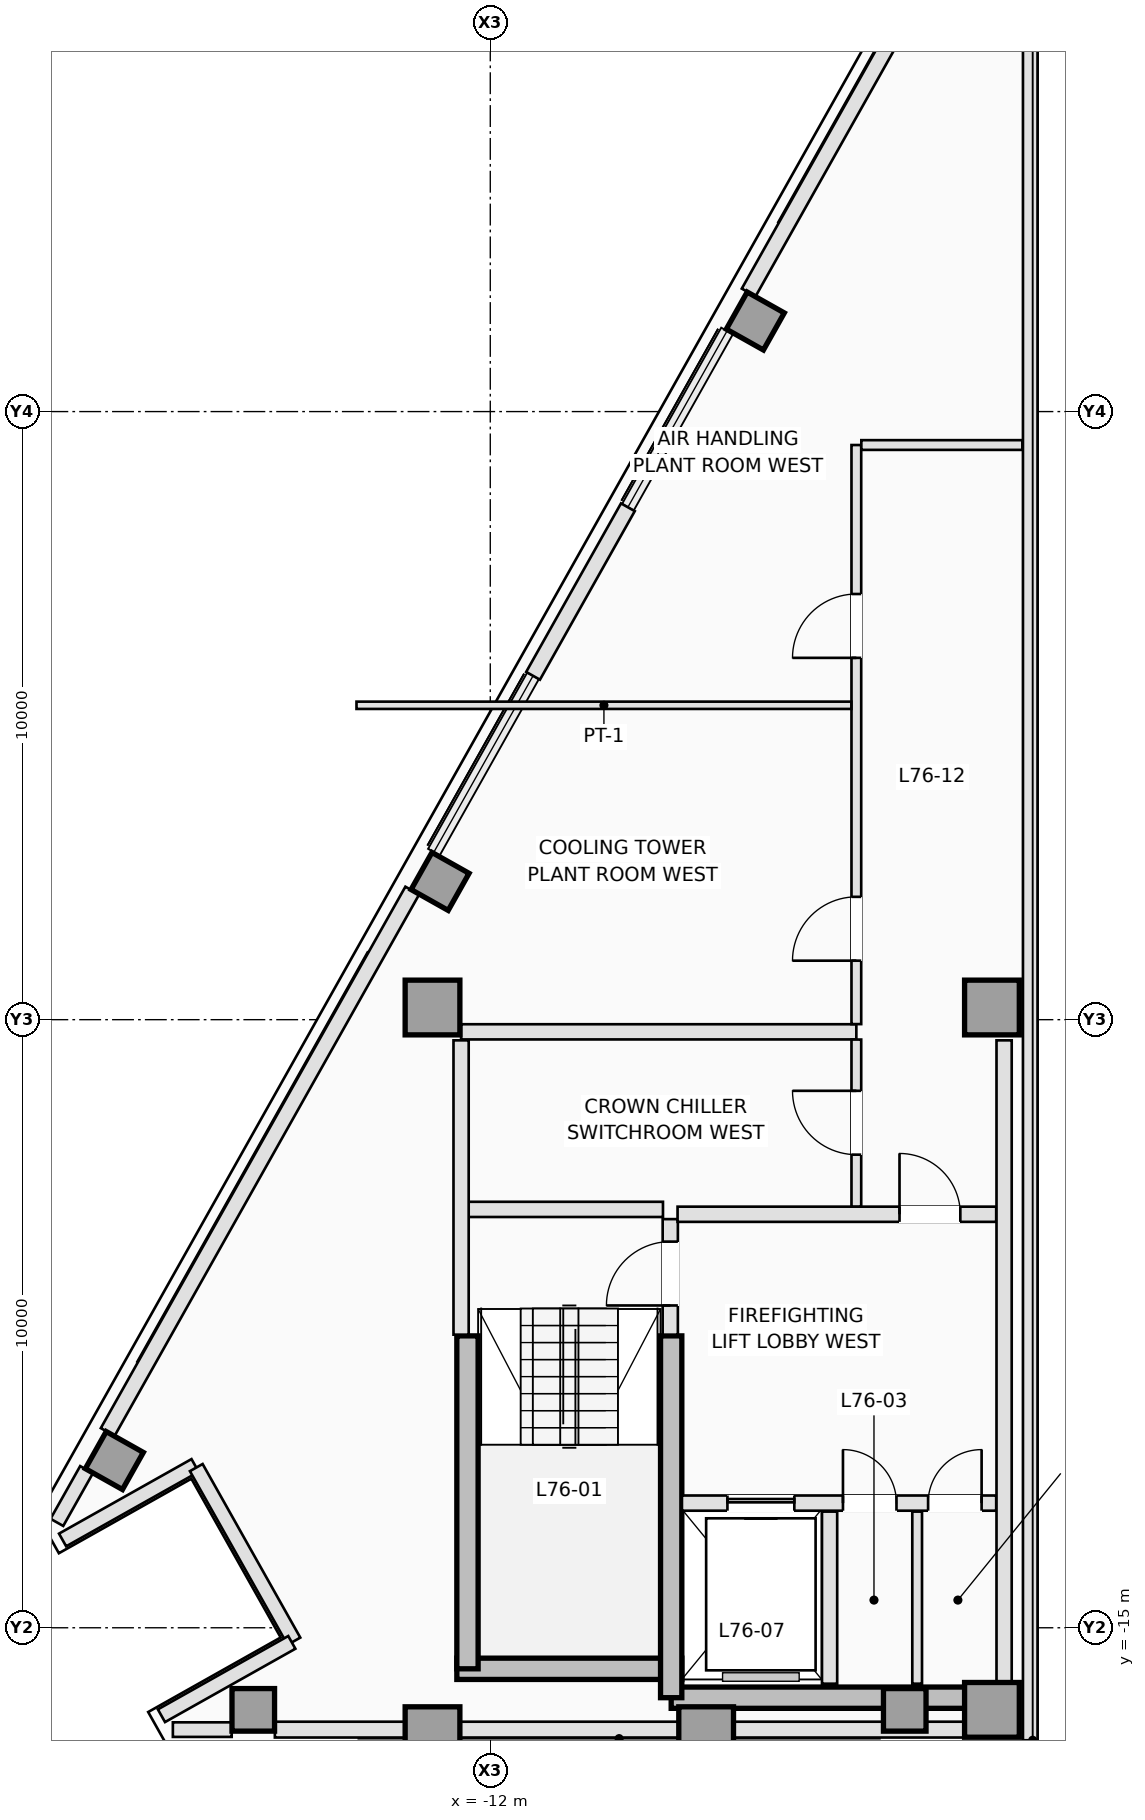
"""IFC4 building model, lengths in metres.
Left out: names, types, materials, properties, quantities, classifications, styles, units other than length and angle.
Written with IfcOpenShell. Run it as: python <this file> out.ifc"""

import sys

from ifc_helpers import new_model, si_unit, direction, frame, frame_2d, origin, origin_2d, place, context, subcontext, project, spatial, rectangle, extrude, element, fill, save


model = new_model("IFC4")
c1 = context("Model", 3, precision=1e-05, world=origin(), true_north=direction((0.0, 1.0)))
c2 = subcontext(c1, "Body", "Model", "MODEL_VIEW")
j1 = project(units=[si_unit("LENGTHUNIT", "METRE"), si_unit("PLANEANGLEUNIT", "RADIAN")], contexts=[c1])
p1 = place(None, origin())
s1 = spatial("IfcSite", under=j1, at=p1, CompositionType="ELEMENT")
p2 = place(p1, origin())
s2 = spatial("IfcBuilding", under=s1, at=p2, CompositionType="ELEMENT")
p3 = place(p2, frame((0.0, 0.0, 274.1)))
s3 = spatial("IfcBuildingStorey", under=s2, at=p3, CompositionType="ELEMENT", Elevation=274.1)
p4 = place(p3, frame((-12.55, -15.675, 0.0), z_axis=(0.0, 0.0, 1.0), x_axis=(1.0, 0.0, 0.0)))
e1 = element("IfcWall", 1, at=p4, inside=s3, PredefinedType="SHEAR", context=c2, shape_type="SweptSolid", body=[
    extrude(rectangle(XDim=3.7, YDim=0.35, at=frame_2d((1.85, 0.0))), origin(), (0.0, 0.0, 1.0), 3.2),
])
p5 = place(p3, frame((-9.025, -16.15, 0.0), z_axis=(0.0, 0.0, 1.0), x_axis=(1.0, 0.0, 0.0)))
e2 = element("IfcWall", 2, at=p5, inside=s3, PredefinedType="SHEAR", context=c2, shape_type="SweptSolid", body=[
    extrude(rectangle(XDim=5.275, YDim=0.35, at=frame_2d((2.637, 0.0))), origin(), (0.0, 0.0, 1.0), 3.2),
])
p6 = place(p3, frame((-12.375, -15.675, 0.0), z_axis=(0.0, 0.0, 1.0), x_axis=(0.0, 1.0, 0.0)))
e3 = element("IfcWall", 3, at=p6, inside=s3, PredefinedType="SHEAR", context=c2, shape_type="SweptSolid", body=[
    extrude(rectangle(XDim=5.475, YDim=0.35, at=frame_2d((2.738, 0.0))), origin(), (0.0, 0.0, 1.0), 3.2),
])
p7 = place(p3, frame((-9.025, -16.15, 0.0), z_axis=(0.0, 0.0, 1.0), x_axis=(0.0, 1.0, 0.0)))
e4 = element("IfcWall", 4, at=p7, inside=s3, PredefinedType="SHEAR", context=c2, shape_type="SweptSolid", body=[
    extrude(rectangle(XDim=5.95, YDim=0.35, at=frame_2d((2.975, 0.0))), origin(), (0.0, 0.0, 1.0), 3.2),
])
for number, where, z_axis, x_axis in (
    (5, (-12.95, -16.75, 0.0), (0.0, 0.0, 1.0), (1.0, 0.0, 0.0)),
    (6, (-8.45, -16.75, 0.0), (0.0, 0.0, 1.0), (1.0, 0.0, 0.0)),
    (7, (-3.75, -16.35, 0.0), (0.0, 0.0, 1.0), (1.0, 0.0, 0.0)),
    (8, (-12.95, -4.8, 0.0), (0.0, 0.0, 1.0), (1.0, 0.0, 0.0)),
    (9, (-3.75, -4.8, 0.0), (0.0, 0.0, 1.0), (1.0, 0.0, 0.0)),
):
    element("IfcColumn", number, at=place(p3, frame(where, z_axis=z_axis, x_axis=x_axis)), inside=s3, PredefinedType="COLUMN", context=c2, shape_type="SweptSolid", body=[
        extrude(rectangle(XDim=0.9, YDim=0.9, at=origin_2d()), origin(), (0.0, 0.0, 1.0), 3.2),
    ])
for number, where, z_axis, x_axis in (
    (10, (-15.898, -16.35, 0.0), (0.0, 0.0, 1.0), (0.0, 1.0, 0.0)),
    (11, (-5.184, -16.35, 0.0), (0.0, 0.0, 1.0), (0.0, 1.0, 0.0)),
    (12, (-7.642, 6.489, 0.0), (0.0, 0.0, 1.0), (-0.872, 0.49, 0.0)),
    (13, (-12.825, -2.727, 0.0), (0.0, 0.0, 1.0), (-0.872, 0.49, 0.0)),
    (14, (-18.182, -12.25, 0.0), (0.0, 0.0, 1.0), (-0.872, 0.49, 0.0)),
):
    element("IfcColumn", number, at=place(p3, frame(where, z_axis=z_axis, x_axis=x_axis)), inside=s3, PredefinedType="COLUMN", context=c2, shape_type="SweptSolid", body=[
        extrude(rectangle(XDim=0.7, YDim=0.7, at=origin_2d()), origin(), (0.0, 0.0, 1.0), 3.2),
    ])
p8 = place(p3, frame((-16.253, -16.675, 0.0), z_axis=(0.0, 0.0, 1.0), x_axis=(-1.0, 0.0, 0.0)))
e15 = element("IfcWall", 15, at=p8, inside=s3, PredefinedType="STANDARD", context=c2, shape_type="SweptSolid", body=[
    extrude(rectangle(XDim=0.967, YDim=0.24, at=frame_2d((0.484, 0.0))), origin(), (0.0, 0.0, 1.0), 2.92),
])
p9 = place(p3, frame((-4.22, -16.675, 0.0), z_axis=(0.0, 0.0, 1.0), x_axis=(-1.0, 0.0, 0.0)))
e16 = element("IfcWall", 16, at=p9, inside=s3, PredefinedType="STANDARD", context=c2, shape_type="SweptSolid", body=[
    extrude(rectangle(XDim=11.323, YDim=0.26, at=frame_2d((5.661, 0.0))), origin(), (0.0, 0.0, 1.0), 2.204),
])
p10 = place(p3, frame((-19.127, -13.267, 0.0), z_axis=(0.0, 0.0, 1.0), x_axis=(0.490261239633, 0.871575537125, 0.0)))
e17 = element("IfcWall", 17, at=p10, inside=s3, PredefinedType="STANDARD", context=c2, shape_type="SweptSolid", body=[
    extrude(rectangle(XDim=0.995, YDim=0.24, at=frame_2d((0.498, 0.0))), origin(), (0.0, 0.0, 1.0), 2.92),
])
p11 = place(p3, frame((-18.292, -11.781, 0.0), z_axis=(0.0, 0.0, 1.0), x_axis=(0.490270316201, 0.871570431492, 0.0)))
e18 = element("IfcWall", 18, at=p11, inside=s3, PredefinedType="STANDARD", context=c2, shape_type="SweptSolid", body=[
    extrude(rectangle(XDim=10.216, YDim=0.26, at=frame_2d((5.108, 0.0))), origin(), (0.0, 0.0, 1.0), 2.92),
])
p12 = place(p3, frame((-7.751, 6.958, 0.0), z_axis=(0.0, 0.0, 1.0), x_axis=(0.490260105081, 0.871576175309, 0.0)))
e19 = element("IfcWall", 19, at=p12, inside=s3, PredefinedType="STANDARD", context=c2, shape_type="SweptSolid", body=[
    extrude(rectangle(XDim=10.217, YDim=0.26, at=frame_2d((5.108, 0.0))), origin(), (0.0, 0.0, 1.0), 2.92),
])
p13 = place(p3, frame((-11.296, 0.655, 0.0), z_axis=(0.0, 0.0, 1.0), x_axis=(0.490283106586, 0.871563236602, 0.0)))
e20 = element("IfcWall", 20, at=p13, inside=s3, PredefinedType="STANDARD", context=c2, shape_type="SweptSolid", body=[
    extrude(rectangle(XDim=3.18, YDim=0.26, at=frame_2d((1.59, 0.0))), origin(), (0.0, 0.0, 1.0), 2.92),
])
p14 = place(p3, frame((-19.033, -13.556, 0.0), z_axis=(0.0, 0.0, 1.0), x_axis=(0.871588577066, 0.490238056792, 0.0)))
e21 = element("IfcWall", 21, at=p14, inside=s3, PredefinedType="STANDARD", context=c2, shape_type="SweptSolid", body=[
    extrude(rectangle(XDim=2.5, YDim=0.24, at=frame_2d((1.25, 0.0))), origin(), (0.0, 0.0, 1.0), 2.92),
])
p15 = place(p3, frame((-16.835, -12.366, 0.0), z_axis=(0.0, 0.0, 1.0), x_axis=(0.490293083368, -0.871557624258, 0.0)))
e22 = element("IfcWall", 22, at=p15, inside=s3, PredefinedType="STANDARD", context=c2, shape_type="SweptSolid", body=[
    extrude(rectangle(XDim=3.276, YDim=0.24, at=frame_2d((1.638, 0.0))), origin(), (0.0, 0.0, 1.0), 2.204),
])
p16 = place(p3, frame((-15.264, -15.24, 0.0), z_axis=(0.0, 0.0, 1.0), x_axis=(-0.87157023615, -0.490270663468, 0.0)))
e23 = element("IfcWall", 23, at=p16, inside=s3, PredefinedType="STANDARD", context=c2, shape_type="SweptSolid", body=[
    extrude(rectangle(XDim=2.46, YDim=0.24, at=frame_2d((1.23, 0.0))), origin(), (0.0, 0.0, 1.0), 2.92),
])
p17 = place(p3, frame((-3.12, 17.2, 0.0), z_axis=(0.0, 0.0, 1.0), x_axis=(0.0, -1.0, 0.0)))
e24 = element("IfcWall", 24, at=p17, inside=s3, PredefinedType="STANDARD", context=c2, shape_type="SweptSolid", body=[
    extrude(rectangle(XDim=34.05, YDim=0.24, at=frame_2d((17.025, 0.0))), origin(), (0.0, 0.0, 1.0), 2.204),
])
p18 = place(p3, frame((-9.04, -10.18, 0.0), z_axis=(0.0, 0.0, 1.0), x_axis=(0.0, 1.0, 0.0)))
e25 = element("IfcWall", 25, at=p18, inside=s3, PredefinedType="PARTITIONING", context=c2, shape_type="SweptSolid", body=[
    extrude(rectangle(XDim=1.9, YDim=0.25, at=frame_2d((0.95, 0.0))), origin(), (0.0, 0.0, 1.0), 2.92),
])
p19 = place(p18, frame((0.48, 0.0, 0.0)))
e26 = element("IfcOpeningElement", 26, at=p19, cuts=e25, PredefinedType="OPENING", context=c2, shape_type="SweptSolid", body=[
    extrude(rectangle(XDim=1.05, YDim=2.15, at=frame_2d((0.525, 1.075))), frame((0.0, 0.135, 0.0), z_axis=(0.0, -1.0, 0.0), x_axis=(1.0, 0.0, 0.0)), (0.0, 0.0, 1.0), 0.27),
])
p20 = place(p3, frame((-12.38, -8.12, 0.0), z_axis=(0.0, 0.0, 1.0), x_axis=(1.0, 0.0, 0.0)))
e27 = element("IfcWall", 27, at=p20, inside=s3, PredefinedType="PARTITIONING", context=c2, shape_type="SweptSolid", body=[
    extrude(rectangle(XDim=3.22, YDim=0.25, at=frame_2d((1.61, 0.0))), origin(), (0.0, 0.0, 1.0), 2.92),
])
p21 = place(p3, frame((-12.48, -10.18, 0.0), z_axis=(0.0, 0.0, 1.0), x_axis=(0.0, 1.0, 0.0)))
e28 = element("IfcWall", 28, at=p21, inside=s3, PredefinedType="PARTITIONING", context=c2, shape_type="SweptSolid", body=[
    extrude(rectangle(XDim=4.84, YDim=0.25, at=frame_2d((2.42, 0.0))), origin(), (0.0, 0.0, 1.0), 2.92),
])
p22 = place(p3, frame((-8.848, -12.95, 0.0), z_axis=(0.0, 0.0, 1.0), x_axis=(1.0, 0.0, 0.0)))
e29 = element("IfcWall", 29, at=p22, inside=s3, PredefinedType="PARTITIONING", context=c2, shape_type="SweptSolid", body=[
    extrude(rectangle(XDim=5.168, YDim=0.25, at=frame_2d((2.584, 0.0))), origin(), (0.0, 0.0, 1.0), 2.92),
])
p23 = place(p22, frame((0.748, 0.0, 0.0)))
e30 = element("IfcOpeningElement", 30, at=p23, cuts=e29, PredefinedType="OPENING", context=c2, shape_type="SweptSolid", body=[
    extrude(rectangle(XDim=1.1, YDim=2.15, at=frame_2d((0.55, 1.075))), frame((0.0, 0.135, 0.0), z_axis=(0.0, -1.0, 0.0), x_axis=(1.0, 0.0, 0.0)), (0.0, 0.0, 1.0), 0.27),
])
p24 = place(p22, frame((2.648, 0.0, 0.0)))
e31 = element("IfcOpeningElement", 31, at=p24, cuts=e29, PredefinedType="OPENING", context=c2, shape_type="SweptSolid", body=[
    extrude(rectangle(XDim=0.88, YDim=2.1, at=frame_2d((0.44, 1.05))), frame((0.0, 0.135, 0.0), z_axis=(0.0, -1.0, 0.0), x_axis=(1.0, 0.0, 0.0)), (0.0, 0.0, 1.0), 0.27),
])
p25 = place(p22, frame((4.048, 0.0, 0.0)))
e32 = element("IfcOpeningElement", 32, at=p25, cuts=e29, PredefinedType="OPENING", context=c2, shape_type="SweptSolid", body=[
    extrude(rectangle(XDim=0.88, YDim=2.1, at=frame_2d((0.44, 1.05))), frame((0.0, 0.135, 0.0), z_axis=(0.0, -1.0, 0.0), x_axis=(1.0, 0.0, 0.0)), (0.0, 0.0, 1.0), 0.27),
])
p26 = place(p3, frame((-6.42, -15.92, 0.0), z_axis=(0.0, 0.0, 1.0), x_axis=(0.0, 1.0, 0.0)))
e33 = element("IfcWall", 33, at=p26, inside=s3, PredefinedType="PARTITIONING", context=c2, shape_type="SweptSolid", body=[
    extrude(rectangle(XDim=2.83, YDim=0.25, at=frame_2d((1.415, 0.0))), origin(), (0.0, 0.0, 1.0), 2.92),
])
p27 = place(p3, frame((-4.98, -15.92, 0.0), z_axis=(0.0, 0.0, 1.0), x_axis=(0.0, 1.0, 0.0)))
e34 = element("IfcWall", 34, at=p27, inside=s3, PredefinedType="PARTITIONING", context=c2, shape_type="SweptSolid", body=[
    extrude(rectangle(XDim=2.83, YDim=0.16, at=frame_2d((1.415, 0.0))), origin(), (0.0, 0.0, 1.0), 2.92),
])
p28 = place(p3, frame((-8.92, -8.2, 0.0), z_axis=(0.0, 0.0, 1.0), x_axis=(1.0, 0.0, 0.0)))
e35 = element("IfcWall", 35, at=p28, inside=s3, PredefinedType="PARTITIONING", context=c2, shape_type="SweptSolid", body=[
    extrude(rectangle(XDim=5.24, YDim=0.25, at=frame_2d((2.62, 0.0))), origin(), (0.0, 0.0, 1.0), 2.92),
])
p29 = place(p28, frame((3.65, 0.0, 0.0)))
e36 = element("IfcOpeningElement", 36, at=p29, cuts=e35, PredefinedType="OPENING", context=c2, shape_type="SweptSolid", body=[
    extrude(rectangle(XDim=1.0, YDim=2.15, at=frame_2d((0.5, 1.075))), frame((0.0, 0.135, 0.0), z_axis=(0.0, -1.0, 0.0), x_axis=(1.0, 0.0, 0.0)), (0.0, 0.0, 1.0), 0.27),
])
p30 = place(p3, frame((-3.55, -15.898, 0.0), z_axis=(0.0, 0.0, 1.0), x_axis=(0.0, 1.0, 0.0)))
e37 = element("IfcWall", 37, at=p30, inside=s3, PredefinedType="PARTITIONING", context=c2, shape_type="SweptSolid", body=[
    extrude(rectangle(XDim=10.558, YDim=0.25, at=frame_2d((5.279, 0.0))), origin(), (0.0, 0.0, 1.0), 2.92),
])
p31 = place(p3, frame((-12.48, -5.2, 0.0), z_axis=(0.0, 0.0, 1.0), x_axis=(1.0, 0.0, 0.0)))
e38 = element("IfcWall", 38, at=p31, inside=s3, PredefinedType="PARTITIONING", context=c2, shape_type="SweptSolid", body=[
    extrude(rectangle(XDim=6.5, YDim=0.25, at=frame_2d((3.25, 0.0))), origin(), (0.0, 0.0, 1.0), 2.92),
])
p32 = place(p3, frame((-5.98, -8.073, 0.0), z_axis=(0.0, 0.0, 1.0), x_axis=(0.0, 1.0, 0.0)))
e39 = element("IfcWall", 39, at=p32, inside=s3, PredefinedType="PARTITIONING", context=c2, shape_type="SweptSolid", body=[
    extrude(rectangle(XDim=2.746, YDim=0.16, at=frame_2d((1.373, 0.0))), origin(), (0.0, 0.0, 1.0), 2.92),
])
p33 = place(p32, frame((0.853, 0.0, 0.0)))
e40 = element("IfcOpeningElement", 40, at=p33, cuts=e39, PredefinedType="OPENING", context=c2, shape_type="SweptSolid", body=[
    extrude(rectangle(XDim=1.05, YDim=2.12, at=frame_2d((0.525, 1.06))), frame((0.0, 0.09, 0.0), z_axis=(0.0, -1.0, 0.0), x_axis=(1.0, 0.0, 0.0)), (0.0, 0.0, 1.0), 0.18),
])
p34 = place(p3, frame((-5.98, -5.073, 0.0), z_axis=(0.0, 0.0, 1.0), x_axis=(0.0, 1.0, 0.0)))
e41 = element("IfcWall", 41, at=p34, inside=s3, PredefinedType="PARTITIONING", context=c2, shape_type="SweptSolid", body=[
    extrude(rectangle(XDim=9.523, YDim=0.16, at=frame_2d((4.761, 0.0))), origin(), (0.0, 0.0, 1.0), 2.92),
])
p35 = place(p34, frame((1.043, 0.0, 0.0)))
e42 = element("IfcOpeningElement", 42, at=p35, cuts=e41, PredefinedType="OPENING", context=c2, shape_type="SweptSolid", body=[
    extrude(rectangle(XDim=1.05, YDim=2.12, at=frame_2d((0.525, 1.06))), frame((0.0, 0.09, 0.0), z_axis=(0.0, -1.0, 0.0), x_axis=(1.0, 0.0, 0.0)), (0.0, 0.0, 1.0), 0.18),
])
p36 = place(p34, frame((6.023, 0.0, 0.0)))
e43 = element("IfcOpeningElement", 43, at=p36, cuts=e41, PredefinedType="OPENING", context=c2, shape_type="SweptSolid", body=[
    extrude(rectangle(XDim=1.05, YDim=2.12, at=frame_2d((0.525, 1.06))), frame((0.0, 0.09, 0.0), z_axis=(0.0, -1.0, 0.0), x_axis=(1.0, 0.0, 0.0)), (0.0, 0.0, 1.0), 0.18),
])
p37 = place(p3, frame((-5.898, 4.45, 0.0), z_axis=(0.0, 0.0, 1.0), x_axis=(1.0, 0.0, 0.0)))
e44 = element("IfcWall", 44, at=p37, inside=s3, PredefinedType="PARTITIONING", context=c2, shape_type="SweptSolid", body=[
    extrude(rectangle(XDim=2.648, YDim=0.16, at=frame_2d((1.324, 0.0))), origin(), (0.0, 0.0, 1.0), 2.92),
])
p38 = place(p3, frame((-14.2, 0.17, 0.0), z_axis=(0.0, 0.0, 1.0), x_axis=(1.0, 0.0, 0.0)))
e45 = element("IfcWall", 45, at=p38, inside=s3, PredefinedType="PARTITIONING", context=c2, shape_type="SweptSolid", body=[
    extrude(rectangle(XDim=8.138, YDim=0.12, at=frame_2d((4.069, 0.0))), origin(), (0.0, 0.0, 1.0), 2.92),
])
p39 = place(p23, origin())
e46 = element("IfcDoor", 46, at=p39, inside=s3, OperationType="SLIDING_TO_LEFT", PredefinedType="DOOR", context=c2, shape_type="SweptSolid", body=[
    extrude(rectangle(XDim=1.1, YDim=2.15, at=frame_2d((0.55, 1.075))), frame((0.0, 0.025, 0.0), z_axis=(0.0, -1.0, 0.0), x_axis=(1.0, 0.0, 0.0)), (0.0, 0.0, 1.0), 0.05),
])
fill(e30, e46)
p40 = place(p19, origin())
e47 = element("IfcDoor", 47, at=p40, inside=s3, OperationType="SINGLE_SWING_LEFT", PredefinedType="DOOR", context=c2, shape_type="SweptSolid", body=[
    extrude(rectangle(XDim=1.05, YDim=2.15, at=frame_2d((0.525, 1.075))), frame((0.0, 0.025, 0.0), z_axis=(0.0, -1.0, 0.0), x_axis=(1.0, 0.0, 0.0)), (0.0, 0.0, 1.0), 0.05),
])
fill(e26, e47)
p41 = place(p24, origin())
e48 = element("IfcDoor", 48, at=p41, inside=s3, OperationType="SINGLE_SWING_LEFT", PredefinedType="TRAPDOOR", context=c2, shape_type="SweptSolid", body=[
    extrude(rectangle(XDim=0.88, YDim=2.1, at=frame_2d((0.44, 1.05))), frame((0.0, 0.025, 0.0), z_axis=(0.0, -1.0, 0.0), x_axis=(1.0, 0.0, 0.0)), (0.0, 0.0, 1.0), 0.05),
])
fill(e31, e48)
p42 = place(p25, origin())
e49 = element("IfcDoor", 49, at=p42, inside=s3, OperationType="SINGLE_SWING_RIGHT", PredefinedType="TRAPDOOR", context=c2, shape_type="SweptSolid", body=[
    extrude(rectangle(XDim=0.88, YDim=2.1, at=frame_2d((0.44, 1.05))), frame((0.0, 0.025, 0.0), z_axis=(0.0, -1.0, 0.0), x_axis=(1.0, 0.0, 0.0)), (0.0, 0.0, 1.0), 0.05),
])
fill(e32, e49)
p43 = place(p29, origin())
e50 = element("IfcDoor", 50, at=p43, inside=s3, OperationType="SINGLE_SWING_LEFT", PredefinedType="DOOR", context=c2, shape_type="SweptSolid", body=[
    extrude(rectangle(XDim=1.0, YDim=2.15, at=frame_2d((0.5, 1.075))), frame((0.0, 0.025, 0.0), z_axis=(0.0, -1.0, 0.0), x_axis=(1.0, 0.0, 0.0)), (0.0, 0.0, 1.0), 0.05),
])
fill(e36, e50)
p44 = place(p33, origin())
e51 = element("IfcDoor", 51, at=p44, inside=s3, OperationType="SINGLE_SWING_RIGHT", PredefinedType="DOOR", context=c2, shape_type="SweptSolid", body=[
    extrude(rectangle(XDim=1.05, YDim=2.12, at=frame_2d((0.525, 1.06))), frame((0.0, 0.025, 0.0), z_axis=(0.0, -1.0, 0.0), x_axis=(1.0, 0.0, 0.0)), (0.0, 0.0, 1.0), 0.05),
])
fill(e40, e51)
p45 = place(p35, origin())
e52 = element("IfcDoor", 52, at=p45, inside=s3, OperationType="SINGLE_SWING_LEFT", PredefinedType="DOOR", context=c2, shape_type="SweptSolid", body=[
    extrude(rectangle(XDim=1.05, YDim=2.12, at=frame_2d((0.525, 1.06))), frame((0.0, 0.025, 0.0), z_axis=(0.0, -1.0, 0.0), x_axis=(1.0, 0.0, 0.0)), (0.0, 0.0, 1.0), 0.05),
])
fill(e42, e52)
p46 = place(p36, origin())
e53 = element("IfcDoor", 53, at=p46, inside=s3, OperationType="SINGLE_SWING_LEFT", PredefinedType="DOOR", context=c2, shape_type="SweptSolid", body=[
    extrude(rectangle(XDim=1.05, YDim=2.12, at=frame_2d((0.525, 1.06))), frame((0.0, 0.025, 0.0), z_axis=(0.0, -1.0, 0.0), x_axis=(1.0, 0.0, 0.0)), (0.0, 0.0, 1.0), 0.05),
])
fill(e43, e53)
save(model, sys.argv[1])
